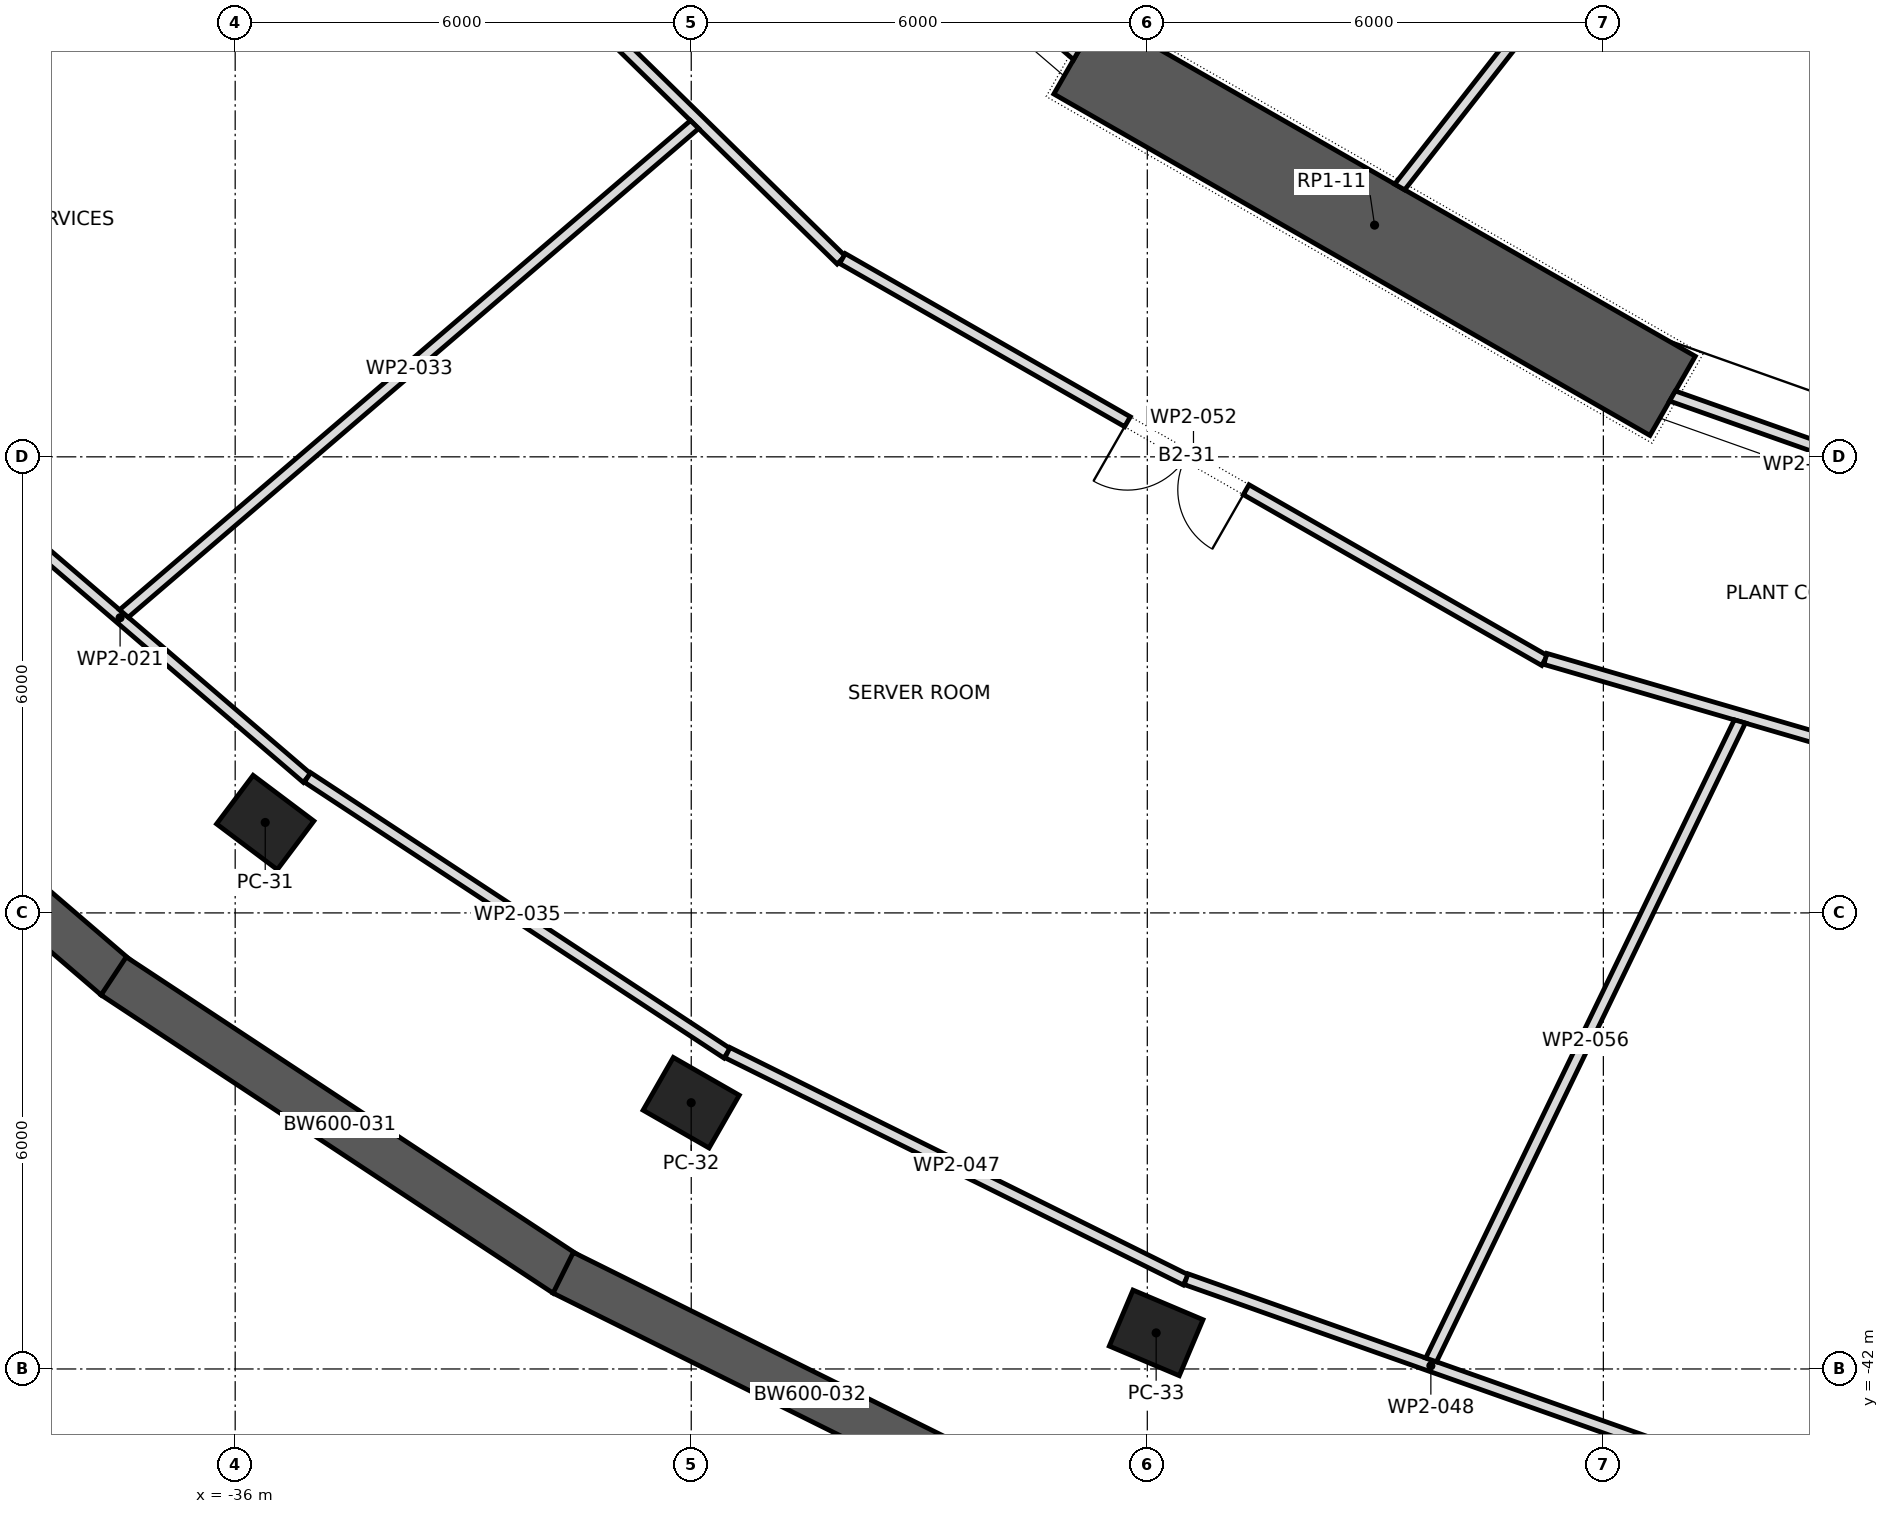
"""IFC4 building model, lengths in metres.
Left out: names, types, materials, properties, quantities, classifications, styles, units other than length and angle.
Written with IfcOpenShell. Run it as: python <this file> out.ifc"""

import sys

from ifc_helpers import new_model, si_unit, direction, frame, frame_2d, origin, origin_2d, place, context, subcontext, project, spatial, polyline, rectangle, outline, extrude, element, fill, save


model = new_model("IFC4")
c1 = context("Model", 3, precision=1e-05, world=origin(), true_north=direction((0.0, 1.0)))
c2 = subcontext(c1, "Body", "Model", "MODEL_VIEW")
j1 = project(units=[si_unit("LENGTHUNIT", "METRE"), si_unit("PLANEANGLEUNIT", "RADIAN")], contexts=[c1])
p1 = place(None, origin())
s1 = spatial("IfcSite", under=j1, at=p1, CompositionType="ELEMENT")
p2 = place(p1, origin())
s2 = spatial("IfcBuilding", under=s1, at=p2, CompositionType="ELEMENT")
p3 = place(p2, frame((0.0, 0.0, -9.5)))
s3 = spatial("IfcBuildingStorey", under=s2, at=p3, CompositionType="ELEMENT", Elevation=-9.5)
for number, where, z_axis, x_axis in (
    (1, (-35.605, -34.81, 0.0), (0.0, 0.0, 1.0), (0.799, -0.601, 0.0)),
    (2, (-30.001, -38.497, 0.0), (0.0, 0.0, 1.0), (0.868, -0.497, 0.0)),
    (3, (-23.884, -41.525, 0.0), (0.0, 0.0, 1.0), (0.921, -0.389, 0.0)),
):
    element("IfcColumn", number, at=place(p3, frame(where, z_axis=z_axis, x_axis=x_axis)), inside=s3, PredefinedType="COLUMN", context=c2, shape_type="SweptSolid", body=[
        extrude(rectangle(XDim=1.0, YDim=0.8, at=origin_2d()), origin(), (0.0, 0.0, 1.0), 5.5),
    ])
p4 = place(p3, frame((-24.931, -24.706, 0.0), z_axis=(0.0, 0.0, 1.0), x_axis=(0.867760656864, -0.496982336103, 0.0)))
e4 = element("IfcWall", 4, at=p4, inside=s3, PredefinedType="SHEAR", context=c2, shape_type="SweptSolid", body=[
    extrude(rectangle(XDim=9.038, YDim=1.2, at=frame_2d((4.519, 0.0))), origin(), (0.0, 0.0, 1.0), 5.5),
])
p5 = place(p3, frame((-42.87, -32.295, 0.0), z_axis=(0.0, 0.0, 1.0), x_axis=(0.758319142722, -0.65188348482, 0.0)))
e5 = element("IfcWall", 5, at=p5, inside=s3, PredefinedType="SOLIDWALL", context=c2, shape_type="SweptSolid", body=[
    extrude(rectangle(XDim=6.991, YDim=0.6, at=frame_2d((3.496, 0.0))), origin(), (0.0, 0.0, 1.0), 5.5),
])
p6 = place(p3, frame((-37.599, -36.83, 0.0), z_axis=(0.0, 0.0, 1.0), x_axis=(0.834745196239, -0.550636411215, 0.0)))
e6 = element("IfcWall", 6, at=p6, inside=s3, PredefinedType="SOLIDWALL", context=c2, shape_type="SweptSolid", body=[
    extrude(rectangle(XDim=7.124, YDim=0.6, at=frame_2d((3.562, 0.0))), origin(), (0.0, 0.0, 1.0), 5.5),
])
p7 = place(p3, frame((-31.684, -40.734, 0.0), z_axis=(0.0, 0.0, 1.0), x_axis=(0.895750986496, -0.44455614965, 0.0)))
e7 = element("IfcWall", 7, at=p7, inside=s3, PredefinedType="SOLIDWALL", context=c2, shape_type="SweptSolid", body=[
    extrude(rectangle(XDim=7.245, YDim=0.6, at=frame_2d((3.623, 0.0))), origin(), (0.0, 0.0, 1.0), 5.5),
])
p8 = place(p3, frame((-39.973, -30.007, 0.0), z_axis=(0.0, 0.0, 1.0), x_axis=(0.759038455419, -0.651045791934, 0.0)))
e8 = element("IfcWall", 8, at=p8, inside=s3, PredefinedType="PARTITIONING", context=c2, shape_type="SweptSolid", body=[
    extrude(rectangle(XDim=6.479, YDim=0.15, at=frame_2d((3.24, 0.0))), origin(), (0.0, 0.0, 1.0), 5.05),
])
p9 = place(p3, frame((-35.389, -20.211, 0.0), z_axis=(0.0, 0.0, 1.0), x_axis=(0.714900505887, -0.699226191359, 0.0)))
e9 = element("IfcWall", 9, at=p9, inside=s3, PredefinedType="PARTITIONING", context=c2, shape_type="SweptSolid", body=[
    extrude(rectangle(XDim=10.296, YDim=0.15, at=frame_2d((5.148, 0.0))), origin(), (0.0, 0.0, 1.0), 5.05),
])
p10 = place(p9, frame((3.353, 0.0, 0.0)))
e10 = element("IfcOpeningElement", 10, at=p10, cuts=e9, PredefinedType="OPENING", context=c2, shape_type="SweptSolid", body=[
    extrude(rectangle(XDim=1.0, YDim=2.1, at=frame_2d((0.5, 1.05))), frame((0.0, 0.087, 0.0), z_axis=(0.0, -1.0, 0.0), x_axis=(1.0, 0.0, 0.0)), (0.0, 0.0, 1.0), 0.174),
])
p11 = place(p3, frame((-29.956, -25.628, 0.0), z_axis=(0.0, 0.0, 1.0), x_axis=(-0.759329804597, -0.650705961131, 0.0)))
e11 = element("IfcWall", 11, at=p11, inside=s3, PredefinedType="PARTITIONING", context=c2, shape_type="SweptSolid", body=[
    extrude(outline(polyline([(0.007, -0.075), (9.899, -0.075), (9.876, 0.075), (-0.007, 0.075), (0.007, -0.075)])), origin(), (0.0, 0.0, 1.0), 5.05),
])
p12 = place(p3, frame((-29.529, -37.847, 0.0), z_axis=(0.0, 0.0, 1.0), x_axis=(-0.83553583791, 0.549435950378, 0.0)))
e12 = element("IfcWall", 12, at=p12, inside=s3, PredefinedType="PARTITIONING", context=c2, shape_type="SweptSolid", body=[
    extrude(rectangle(XDim=6.606, YDim=0.15, at=frame_2d((3.303, 0.0))), origin(), (0.0, 0.0, 1.0), 5.05),
])
p13 = place(p3, frame((-28.789, -21.411, 0.0), z_axis=(0.0, 0.0, 1.0), x_axis=(0.760084552743, -0.649824185978, 0.0)))
e13 = element("IfcWall", 13, at=p13, inside=s3, PredefinedType="PARTITIONING", context=c2, shape_type="SweptSolid", body=[
    extrude(outline(polyline([(-0.015, -0.075), (5.089, -0.075), (5.061, 0.075), (0.015, 0.075), (-0.015, -0.075)])), origin(), (0.0, 0.0, 1.0), 4.6),
])
p14 = place(p3, frame((-23.493, -40.828, 0.0), z_axis=(0.0, 0.0, 1.0), x_axis=(-0.895909442692, 0.444236727991, 0.0)))
e14 = element("IfcWall", 14, at=p14, inside=s3, PredefinedType="PARTITIONING", context=c2, shape_type="SweptSolid", body=[
    extrude(rectangle(XDim=6.731, YDim=0.15, at=frame_2d((3.365, 0.0))), origin(), (0.0, 0.0, 1.0), 5.05),
])
p15 = place(p3, frame((-23.49, -40.819, 0.0), z_axis=(0.0, 0.0, 1.0), x_axis=(0.942678523295, -0.333702265079, 0.0)))
e15 = element("IfcWall", 15, at=p15, inside=s3, PredefinedType="PARTITIONING", context=c2, shape_type="SweptSolid", body=[
    extrude(rectangle(XDim=6.832, YDim=0.15, at=frame_2d((3.416, 0.0))), origin(), (0.0, 0.0, 1.0), 5.05),
])
p16 = place(p3, frame((-20.68, -26.45, 0.0), z_axis=(0.0, 0.0, 1.0), x_axis=(0.616465586388, 0.787381851962, 0.0)))
e16 = element("IfcWall", 16, at=p16, inside=s3, PredefinedType="PARTITIONING", context=c2, shape_type="SweptSolid", body=[
    extrude(outline(polyline([(0.011, -0.075), (14.1, -0.075), (14.1, 0.075), (-0.011, 0.075), (0.011, -0.075)])), origin(), (0.0, 0.0, 1.0), 5.05),
])
p17 = place(p3, frame((-18.774, -32.679, 0.0), z_axis=(0.0, 0.0, 1.0), x_axis=(-0.867830645151, 0.496860112444, 0.0)))
e17 = element("IfcWall", 17, at=p17, inside=s3, PredefinedType="PARTITIONING", context=c2, shape_type="SweptSolid", body=[
    extrude(rectangle(XDim=10.643, YDim=0.15, at=frame_2d((5.322, 0.0))), origin(), (0.0, 0.0, 1.0), 5.05),
])
p18 = place(p17, frame((4.523, 0.0, 0.0)))
e18 = element("IfcOpeningElement", 18, at=p18, cuts=e17, PredefinedType="OPENING", context=c2, shape_type="SweptSolid", body=[
    extrude(rectangle(XDim=1.8, YDim=2.1, at=frame_2d((0.9, 1.05))), frame((0.0, 0.087, 0.0), z_axis=(0.0, -1.0, 0.0), x_axis=(1.0, 0.0, 0.0)), (0.0, 0.0, 1.0), 0.174),
])
p19 = place(p3, frame((-18.763, -32.658, 0.0), z_axis=(0.0, 0.0, 1.0), x_axis=(0.960103579148, -0.279644626818, 0.0)))
e19 = element("IfcWall", 19, at=p19, inside=s3, PredefinedType="PARTITIONING", context=c2, shape_type="SweptSolid", body=[
    extrude(rectangle(XDim=10.975, YDim=0.15, at=frame_2d((5.487, 0.0))), origin(), (0.0, 0.0, 1.0), 5.05),
])
p20 = place(p3, frame((-17.091, -29.2, 0.0), z_axis=(0.0, 0.0, 1.0), x_axis=(0.942814385805, -0.333318217204, 0.0)))
e20 = element("IfcWall", 20, at=p20, inside=s3, PredefinedType="PARTITIONING", context=c2, shape_type="SweptSolid", body=[
    extrude(outline(polyline([(-0.014, -0.075), (5.448, -0.075), (5.422, 0.075), (0.014, 0.075), (-0.014, -0.075)])), origin(), (0.0, 0.0, 1.0), 4.6),
])
p21 = place(p3, frame((-16.204, -33.481, 0.0), z_axis=(0.0, 0.0, 1.0), x_axis=(-0.435389941519, -0.90024196682, 0.0)))
e21 = element("IfcWall", 21, at=p21, inside=s3, PredefinedType="PARTITIONING", context=c2, shape_type="SweptSolid", body=[
    extrude(outline(polyline([(0.013, -0.075), (9.339, -0.075), (9.323, 0.075), (-0.013, 0.075), (0.013, -0.075)])), origin(), (0.0, 0.0, 1.0), 5.05),
])
p22 = place(p18, origin())
e22 = element("IfcDoor", 22, at=p22, inside=s3, OperationType="DOUBLE_DOOR_SINGLE_SWING", PredefinedType="DOOR", context=c2, shape_type="SweptSolid", body=[
    extrude(rectangle(XDim=1.8, YDim=2.1, at=frame_2d((0.9, 1.05))), frame((0.0, 0.025, 0.0), z_axis=(0.0, -1.0, 0.0), x_axis=(1.0, 0.0, 0.0)), (0.0, 0.0, 1.0), 0.05),
])
fill(e18, e22)
save(model, sys.argv[1])
